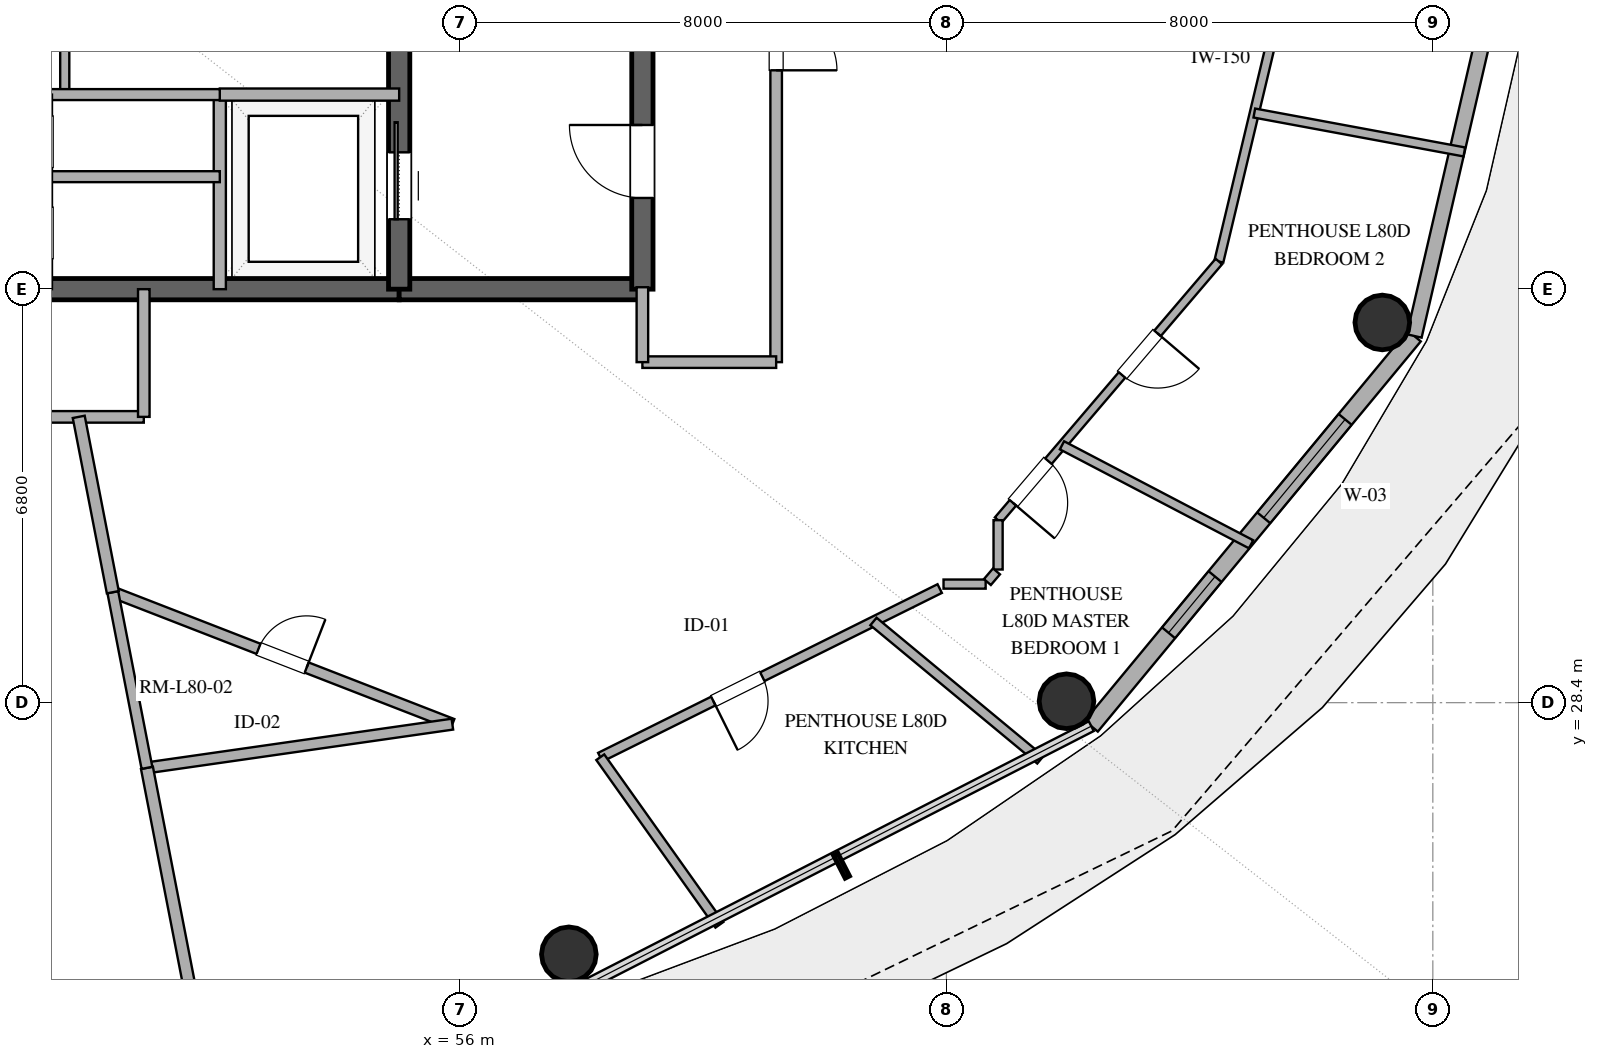
"""IFC4 building model, lengths in metres.
Left out: names, types, materials, properties, quantities, classifications, styles, units other than length and angle.
Written with IfcOpenShell. Run it as: python <this file> out.ifc"""

import sys

from ifc_helpers import new_model, si_unit, direction, frame, frame_2d, origin, origin_2d, place, context, subcontext, project, spatial, rectangle, hollow_circle, extrude, element, fill, save


model = new_model("IFC4")
c1 = context("Model", 3, precision=1e-05, world=origin(), true_north=direction((0.0, 1.0)))
c2 = subcontext(c1, "Body", "Model", "MODEL_VIEW")
j1 = project(units=[si_unit("LENGTHUNIT", "METRE"), si_unit("PLANEANGLEUNIT", "RADIAN")], contexts=[c1])
p1 = place(None, origin())
s1 = spatial("IfcSite", under=j1, at=p1, CompositionType="ELEMENT")
p2 = place(p1, origin())
s2 = spatial("IfcBuilding", under=s1, at=p2, CompositionType="ELEMENT")
p3 = place(p2, frame((0.0, 0.0, 309.0)))
s3 = spatial("IfcBuildingStorey", under=s2, at=p3, CompositionType="ELEMENT", Elevation=309.0)
p4 = place(p3, frame((41.0, 35.2, 0.0), z_axis=(0.0, 0.0, 1.0), x_axis=(1.0, 0.0, 0.0)))
e1 = element("IfcWall", 1, at=p4, inside=s3, PredefinedType="SHEAR", context=c2, shape_type="SweptSolid", body=[
    extrude(rectangle(XDim=14.0, YDim=0.35, at=frame_2d((7.0, 0.0))), origin(), (0.0, 0.0, 1.0), 3.37),
])
p5 = place(p4, frame((6.1, 0.0, 0.0)))
e2 = element("IfcOpeningElement", 2, at=p5, cuts=e1, PredefinedType="OPENING", context=c2, shape_type="SweptSolid", body=[
    extrude(rectangle(XDim=1.8, YDim=2.25, at=frame_2d((0.9, 1.125))), frame((0.0, 0.185, 0.0), z_axis=(0.0, -1.0, 0.0), x_axis=(1.0, 0.0, 0.0)), (0.0, 0.0, 1.0), 0.37),
])
p6 = place(p3, frame((55.0, 35.2, 0.0), z_axis=(0.0, 0.0, 1.0), x_axis=(1.0, 0.0, 0.0)))
e3 = element("IfcWall", 3, at=p6, inside=s3, PredefinedType="SHEAR", context=c2, shape_type="SweptSolid", body=[
    extrude(rectangle(XDim=4.0, YDim=0.35, at=frame_2d((2.0, 0.0))), origin(), (0.0, 0.0, 1.0), 3.37),
])
p7 = place(p3, frame((59.0, 35.2, 0.0), z_axis=(0.0, 0.0, 1.0), x_axis=(0.0, 1.0, 0.0)))
e4 = element("IfcWall", 4, at=p7, inside=s3, PredefinedType="SHEAR", context=c2, shape_type="SweptSolid", body=[
    extrude(rectangle(XDim=13.6, YDim=0.35, at=frame_2d((6.8, 0.0))), origin(), (0.0, 0.0, 1.0), 3.37),
])
p8 = place(p7, frame((1.5, 0.0, 0.0)))
e5 = element("IfcOpeningElement", 5, at=p8, cuts=e4, PredefinedType="OPENING", context=c2, shape_type="SweptSolid", body=[
    extrude(rectangle(XDim=1.2, YDim=2.15, at=frame_2d((0.6, 1.075))), frame((0.0, 0.185, 0.0), z_axis=(0.0, -1.0, 0.0), x_axis=(1.0, 0.0, 0.0)), (0.0, 0.0, 1.0), 0.37),
])
p9 = place(p3, frame((55.0, 35.2, 0.0), z_axis=(0.0, 0.0, 1.0), x_axis=(0.0, 1.0, 0.0)))
e6 = element("IfcWall", 6, at=p9, inside=s3, PredefinedType="SHEAR", context=c2, shape_type="SweptSolid", body=[
    extrude(rectangle(XDim=13.6, YDim=0.35, at=frame_2d((6.8, 0.0))), origin(), (0.0, 0.0, 1.0), 3.37),
])
p10 = place(p9, frame((1.15, 0.0, 0.0)))
e7 = element("IfcOpeningElement", 7, at=p10, cuts=e6, PredefinedType="OPENING", context=c2, shape_type="SweptSolid", body=[
    extrude(rectangle(XDim=1.1, YDim=2.2, at=frame_2d((0.55, 1.1))), frame((0.0, 0.185, 0.0), z_axis=(0.0, -1.0, 0.0), x_axis=(1.0, 0.0, 0.0)), (0.0, 0.0, 1.0), 0.37),
])
for number, where, z_axis, x_axis in (
    (8, (57.791, 24.261, 0.0), (0.0, 0.0, 1.0), (1.0, 0.0, 0.0)),
    (9, (65.975, 28.424, 0.0), (0.0, 0.0, 1.0), (1.0, 0.0, 0.0)),
    (10, (71.169, 34.653, 0.0), (0.0, 0.0, 1.0), (1.0, 0.0, 0.0)),
):
    element("IfcColumn", number, at=place(p3, frame(where, z_axis=z_axis, x_axis=x_axis)), inside=s3, PredefinedType="COLUMN", context=c2, shape_type="SweptSolid", body=[
        extrude(hollow_circle(Radius=0.45, WallThickness=0.025, at=origin_2d()), origin(), (0.0, 0.0, 1.0), 3.37),
    ])
p11 = place(p3, frame((48.0, 22.22, 0.0), z_axis=(0.0, 0.0, 1.0), x_axis=(0.988882522213, 0.148698881169, 0.0)))
e11 = element("IfcWall", 11, at=p11, inside=s3, PredefinedType="SOLIDWALL", context=c2, shape_type="SweptSolid", body=[
    extrude(rectangle(XDim=10.125, YDim=0.28, at=frame_2d((5.062, 0.0))), origin(), (0.0, 0.0, 1.0), 3.37),
])
p12 = place(p11, frame((1.516, 0.0, 0.0)))
e12 = element("IfcOpeningElement", 12, at=p12, cuts=e11, PredefinedType="OPENING", context=c2, shape_type="SweptSolid", body=[
    extrude(rectangle(XDim=1.05, YDim=2.2, at=frame_2d((0.525, 1.1))), frame((0.0, 0.15, 0.0), z_axis=(0.0, -1.0, 0.0), x_axis=(1.0, 0.0, 0.0)), (0.0, 0.0, 1.0), 0.3),
])
p13 = place(p11, frame((4.75, 0.0, 0.85)))
e13 = element("IfcOpeningElement", 13, at=p13, cuts=e11, PredefinedType="OPENING", context=c2, shape_type="SweptSolid", body=[
    extrude(rectangle(XDim=1.2, YDim=1.8, at=frame_2d((0.6, 0.9))), frame((0.0, 0.15, 0.0), z_axis=(0.0, -1.0, 0.0), x_axis=(1.0, 0.0, 0.0)), (0.0, 0.0, 1.0), 0.3),
])
p14 = place(p11, frame((6.668, 0.0, 0.85)))
e14 = element("IfcOpeningElement", 14, at=p14, cuts=e11, PredefinedType="OPENING", context=c2, shape_type="SweptSolid", body=[
    extrude(rectangle(XDim=1.2, YDim=1.8, at=frame_2d((0.6, 0.9))), frame((0.0, 0.15, 0.0), z_axis=(0.0, -1.0, 0.0), x_axis=(1.0, 0.0, 0.0)), (0.0, 0.0, 1.0), 0.3),
])
p15 = place(p3, frame((66.383, 28.013, 0.0), z_axis=(0.0, 0.0, 1.0), x_axis=(0.63761509934, 0.770355103243, 0.0)))
e15 = element("IfcWall", 15, at=p15, inside=s3, PredefinedType="SOLIDWALL", context=c2, shape_type="SweptSolid", body=[
    extrude(rectangle(XDim=8.33, YDim=0.28, at=frame_2d((4.165, 0.0))), origin(), (0.0, 0.0, 1.0), 3.37),
])
p16 = place(p15, frame((1.993, 0.0, 0.85)))
e16 = element("IfcOpeningElement", 16, at=p16, cuts=e15, PredefinedType="OPENING", context=c2, shape_type="SweptSolid", body=[
    extrude(rectangle(XDim=1.2, YDim=1.6, at=frame_2d((0.6, 0.8))), frame((0.0, 0.15, 0.0), z_axis=(0.0, -1.0, 0.0), x_axis=(1.0, 0.0, 0.0)), (0.0, 0.0, 1.0), 0.3),
])
p17 = place(p15, frame((4.448, 0.0, 0.85)))
e17 = element("IfcOpeningElement", 17, at=p17, cuts=e15, PredefinedType="OPENING", context=c2, shape_type="SweptSolid", body=[
    extrude(rectangle(XDim=2.1, YDim=2.2, at=frame_2d((1.05, 1.1))), frame((0.0, 0.15, 0.0), z_axis=(0.0, -1.0, 0.0), x_axis=(1.0, 0.0, 0.0)), (0.0, 0.0, 1.0), 0.3),
])
p18 = place(p3, frame((71.694, 34.43, 0.0), z_axis=(0.0, 0.0, 1.0), x_axis=(0.225635078214, 0.974211892495, 0.0)))
e18 = element("IfcWall", 18, at=p18, inside=s3, PredefinedType="SOLIDWALL", context=c2, shape_type="SweptSolid", body=[
    extrude(rectangle(XDim=7.77, YDim=0.25, at=frame_2d((3.885, 0.0))), origin(), (0.0, 0.0, 1.0), 3.37),
])
p19 = place(p3, frame((52.05, 35.2, 0.0), z_axis=(0.0, 0.0, 1.0), x_axis=(0.0, 1.0, 0.0)))
e19 = element("IfcWall", 19, at=p19, inside=s3, PredefinedType="SOLIDWALL", context=c2, shape_type="SweptSolid", body=[
    extrude(rectangle(XDim=3.2, YDim=0.2, at=frame_2d((1.6, 0.0))), origin(), (0.0, 0.0, 1.0), 2.73),
])
p20 = place(p3, frame((52.05, 38.4, 0.0), z_axis=(0.0, 0.0, 1.0), x_axis=(1.0, 0.0, 0.0)))
e20 = element("IfcWall", 20, at=p20, inside=s3, PredefinedType="SOLIDWALL", context=c2, shape_type="SweptSolid", body=[
    extrude(rectangle(XDim=2.95, YDim=0.2, at=frame_2d((1.475, 0.0))), origin(), (0.0, 0.0, 1.0), 2.73),
])
p21 = place(p3, frame((49.5, 38.4, 0.0), z_axis=(0.0, 0.0, 1.0), x_axis=(0.0, 1.0, 0.0)))
e21 = element("IfcWall", 21, at=p21, inside=s3, PredefinedType="PARTITIONING", context=c2, shape_type="SweptSolid", body=[
    extrude(rectangle(XDim=2.58, YDim=0.15, at=frame_2d((1.29, 0.0))), origin(), (0.0, 0.0, 1.0), 2.73),
])
p22 = place(p21, frame((0.8, 0.0, 0.0)))
e22 = element("IfcOpeningElement", 22, at=p22, cuts=e21, PredefinedType="OPENING", context=c2, shape_type="SweptSolid", body=[
    extrude(rectangle(XDim=0.9, YDim=2.15, at=frame_2d((0.45, 1.075))), frame((0.0, 0.085, 0.0), z_axis=(0.0, -1.0, 0.0), x_axis=(1.0, 0.0, 0.0)), (0.0, 0.0, 1.0), 0.17),
])
for number, where, z_axis, x_axis in (
    (23, (49.2, 37.05, 0.0), (0.0, 0.0, 1.0), (1.0, 0.0, 0.0)),
    (24, (49.2, 38.4, 0.0), (0.0, 0.0, 1.0), (1.0, 0.0, 0.0)),
):
    element("IfcWall", number, at=place(p3, frame(where, z_axis=z_axis, x_axis=x_axis)), inside=s3, PredefinedType="PLUMBINGWALL", context=c2, shape_type="SweptSolid", body=[
        extrude(rectangle(XDim=2.85, YDim=0.18, at=frame_2d((1.425, 0.0))), origin(), (0.0, 0.0, 1.0), 2.73),
    ])
p23 = place(p3, frame((61.2, 50.9, 0.0), z_axis=(0.0, 0.0, 1.0), x_axis=(0.0, -1.0, 0.0)))
e25 = element("IfcWall", 25, at=p23, inside=s3, PredefinedType="PARTITIONING", context=c2, shape_type="SweptSolid", body=[
    extrude(rectangle(XDim=16.9, YDim=0.19, at=frame_2d((8.45, 0.0))), origin(), (0.0, 0.0, 1.0), 2.73),
])
p24 = place(p23, frame((11.101, 0.0, 0.0)))
e26 = element("IfcOpeningElement", 26, at=p24, cuts=e25, PredefinedType="OPENING", context=c2, shape_type="SweptSolid", body=[
    extrude(rectangle(XDim=1.0, YDim=2.2, at=frame_2d((0.5, 1.1))), frame((0.0, 0.105, 0.0), z_axis=(0.0, -1.0, 0.0), x_axis=(1.0, 0.0, 0.0)), (0.0, 0.0, 1.0), 0.21),
])
p25 = place(p3, frame((50.291, 30.216, 0.0), z_axis=(0.0, 0.0, 1.0), x_axis=(0.932120865565, -0.362147334628, 0.0)))
e27 = element("IfcWall", 27, at=p25, inside=s3, PredefinedType="PLUMBINGWALL", context=c2, shape_type="SweptSolid", body=[
    extrude(rectangle(XDim=5.991, YDim=0.18, at=frame_2d((2.996, 0.0))), origin(), (0.0, 0.0, 1.0), 2.73),
])
p26 = place(p25, frame((2.571, 0.0, 0.0)))
e28 = element("IfcOpeningElement", 28, at=p26, cuts=e27, PredefinedType="OPENING", context=c2, shape_type="SweptSolid", body=[
    extrude(rectangle(XDim=0.85, YDim=2.1, at=frame_2d((0.425, 1.05))), frame((0.0, 0.1, 0.0), z_axis=(0.0, -1.0, 0.0), x_axis=(1.0, 0.0, 0.0)), (0.0, 0.0, 1.0), 0.2),
])
p27 = place(p3, frame((55.875, 28.047, 0.0), z_axis=(0.0, 0.0, 1.0), x_axis=(-0.989917714359, -0.141643633102, 0.0)))
e29 = element("IfcWall", 29, at=p27, inside=s3, PredefinedType="PLUMBINGWALL", context=c2, shape_type="SweptSolid", body=[
    extrude(rectangle(XDim=5.074, YDim=0.18, at=frame_2d((2.537, 0.0))), origin(), (0.0, 0.0, 1.0), 2.73),
])
p28 = place(p3, frame((63.89, 30.276, 0.0), z_axis=(0.0, 0.0, 1.0), x_axis=(-0.895583517023, -0.444893429977, 0.0)))
e30 = element("IfcWall", 30, at=p28, inside=s3, PredefinedType="PLUMBINGWALL", context=c2, shape_type="SweptSolid", body=[
    extrude(rectangle(XDim=6.233, YDim=0.16, at=frame_2d((3.117, 0.0))), origin(), (0.0, 0.0, 1.0), 2.73),
])
p29 = place(p28, frame((3.257, 0.0, 0.0)))
e31 = element("IfcOpeningElement", 31, at=p29, cuts=e30, PredefinedType="OPENING", context=c2, shape_type="SweptSolid", body=[
    extrude(rectangle(XDim=0.9, YDim=2.1, at=frame_2d((0.45, 1.05))), frame((0.0, 0.09, 0.0), z_axis=(0.0, -1.0, 0.0), x_axis=(1.0, 0.0, 0.0)), (0.0, 0.0, 1.0), 0.18),
])
p30 = place(p3, frame((51.759, 22.664, 0.0), z_axis=(0.0, 0.0, 1.0), x_axis=(-0.190846277625, 0.981619935778, 0.0)))
e32 = element("IfcWall", 32, at=p30, inside=s3, PredefinedType="PARTITIONING", context=c2, shape_type="SweptSolid", body=[
    extrude(rectangle(XDim=4.751, YDim=0.2, at=frame_2d((2.375, 0.0))), origin(), (0.0, 0.0, 1.0), 2.73),
])
p31 = place(p3, frame((50.8, 33.1, 0.0), z_axis=(0.0, 0.0, 1.0), x_axis=(-1.0, 0.0, 0.0)))
e33 = element("IfcWall", 33, at=p31, inside=s3, PredefinedType="PARTITIONING", context=c2, shape_type="SweptSolid", body=[
    extrude(rectangle(XDim=5.6, YDim=0.19, at=frame_2d((2.8, 0.0))), origin(), (0.0, 0.0, 1.0), 2.73),
])
p32 = place(p3, frame((68.481, 35.655, 0.0), z_axis=(0.0, 0.0, 1.0), x_axis=(0.232298462197, 0.972644551962, 0.0)))
e34 = element("IfcWall", 34, at=p32, inside=s3, PredefinedType="PARTITIONING", context=c2, shape_type="SweptSolid", body=[
    extrude(rectangle(XDim=6.523, YDim=0.15, at=frame_2d((3.262, 0.0))), origin(), (0.0, 0.0, 1.0), 2.73),
])
p33 = place(p3, frame((68.481, 35.655, 0.0), z_axis=(0.0, 0.0, 1.0), x_axis=(-0.649186624806, -0.760629164688, 0.0)))
e35 = element("IfcWall", 35, at=p33, inside=s3, PredefinedType="PARTITIONING", context=c2, shape_type="SweptSolid", body=[
    extrude(rectangle(XDim=5.593, YDim=0.14, at=frame_2d((2.796, 0.0))), origin(), (0.0, 0.0, 1.0), 2.73),
])
p34 = place(p33, frame((1.553, 0.0, 0.0)))
e36 = element("IfcOpeningElement", 36, at=p34, cuts=e35, PredefinedType="OPENING", context=c2, shape_type="SweptSolid", body=[
    extrude(rectangle(XDim=0.9, YDim=2.1, at=frame_2d((0.45, 1.05))), frame((0.0, 0.08, 0.0), z_axis=(0.0, -1.0, 0.0), x_axis=(1.0, 0.0, 0.0)), (0.0, 0.0, 1.0), 0.16),
])
p35 = place(p33, frame((4.317, 0.0, 0.0)))
e37 = element("IfcOpeningElement", 37, at=p35, cuts=e35, PredefinedType="OPENING", context=c2, shape_type="SweptSolid", body=[
    extrude(rectangle(XDim=0.9, YDim=2.1, at=frame_2d((0.45, 1.05))), frame((0.0, 0.08, 0.0), z_axis=(0.0, -1.0, 0.0), x_axis=(1.0, 0.0, 0.0)), (0.0, 0.0, 1.0), 0.16),
])
p36 = place(p3, frame((65.545, 27.461, 0.0), z_axis=(0.0, 0.0, 1.0), x_axis=(-0.770009063214, 0.63803294787, 0.0)))
e38 = element("IfcWall", 38, at=p36, inside=s3, PredefinedType="PLUMBINGWALL", context=c2, shape_type="SweptSolid", body=[
    extrude(rectangle(XDim=3.565, YDim=0.16, at=frame_2d((1.782, 0.0))), origin(), (0.0, 0.0, 1.0), 2.73),
])
p37 = place(p3, frame((72.518, 37.457, 0.0), z_axis=(0.0, 0.0, 1.0), x_axis=(-0.983264946239, 0.182181353322, 0.0)))
e39 = element("IfcWall", 39, at=p37, inside=s3, PredefinedType="PARTITIONING", context=c2, shape_type="SweptSolid", body=[
    extrude(rectangle(XDim=3.512, YDim=0.15, at=frame_2d((1.756, 0.0))), origin(), (0.0, 0.0, 1.0), 2.73),
])
p38 = place(p3, frame((65.901, 32.632, 0.0), z_axis=(0.0, 0.0, 1.0), x_axis=(0.886011177193, -0.463663880293, 0.0)))
e40 = element("IfcWall", 40, at=p38, inside=s3, PredefinedType="PARTITIONING", context=c2, shape_type="SweptSolid", body=[
    extrude(rectangle(XDim=3.51, YDim=0.15, at=frame_2d((1.755, 0.0))), origin(), (0.0, 0.0, 1.0), 2.73),
])
p39 = place(p3, frame((58.307, 27.503, 0.0), z_axis=(0.0, 0.0, 1.0), x_axis=(0.579474768135, -0.814990179754, 0.0)))
e41 = element("IfcWall", 41, at=p39, inside=s3, PredefinedType="PLUMBINGWALL", context=c2, shape_type="SweptSolid", body=[
    extrude(rectangle(XDim=3.381, YDim=0.16, at=frame_2d((1.691, 0.0))), origin(), (0.0, 0.0, 1.0), 2.73),
])
p40 = place(p3, frame((50.852, 27.328, 0.0), z_axis=(0.0, 0.0, 1.0), x_axis=(-0.190751955115, 0.981638269232, 0.0)))
e42 = element("IfcWall", 42, at=p40, inside=s3, PredefinedType="PLUMBINGWALL", context=c2, shape_type="SweptSolid", body=[
    extrude(rectangle(XDim=2.942, YDim=0.18, at=frame_2d((1.471, 0.0))), origin(), (0.0, 0.0, 1.0), 2.73),
])
p41 = place(p3, frame((50.291, 30.216, 0.0), z_axis=(0.0, 0.0, 1.0), x_axis=(-0.190807376865, 0.981627498053, 0.0)))
e43 = element("IfcWall", 43, at=p41, inside=s3, PredefinedType="PARTITIONING", context=c2, shape_type="SweptSolid", body=[
    extrude(rectangle(XDim=2.938, YDim=0.2, at=frame_2d((1.469, 0.0))), origin(), (0.0, 0.0, 1.0), 2.73),
])
p42 = place(p3, frame((61.2, 34.0, 0.0), z_axis=(0.0, 0.0, 1.0), x_axis=(-1.0, 0.0, 0.0)))
e44 = element("IfcWall", 44, at=p42, inside=s3, PredefinedType="PARTITIONING", context=c2, shape_type="SweptSolid", body=[
    extrude(rectangle(XDim=2.2, YDim=0.19, at=frame_2d((1.1, 0.0))), origin(), (0.0, 0.0, 1.0), 2.73),
])
p43 = place(p3, frame((50.8, 35.2, 0.0), z_axis=(0.0, 0.0, 1.0), x_axis=(0.0, -1.0, 0.0)))
e45 = element("IfcWall", 45, at=p43, inside=s3, PredefinedType="PARTITIONING", context=c2, shape_type="SweptSolid", body=[
    extrude(rectangle(XDim=2.1, YDim=0.19, at=frame_2d((1.05, 0.0))), origin(), (0.0, 0.0, 1.0), 2.73),
])
p44 = place(p3, frame((59.0, 34.0, 0.0), z_axis=(0.0, 0.0, 1.0), x_axis=(0.0, 1.0, 0.0)))
e46 = element("IfcWall", 46, at=p44, inside=s3, PredefinedType="PARTITIONING", context=c2, shape_type="SweptSolid", body=[
    extrude(rectangle(XDim=1.232, YDim=0.19, at=frame_2d((0.616, 0.0))), origin(), (0.0, 0.0, 1.0), 2.73),
])
p45 = place(p3, frame((64.85, 31.401, 0.0), z_axis=(0.0, 0.0, 1.0), x_axis=(0.0, -1.0, 0.0)))
e47 = element("IfcWall", 47, at=p45, inside=s3, PredefinedType="PARTITIONING", context=c2, shape_type="SweptSolid", body=[
    extrude(rectangle(XDim=0.812, YDim=0.15, at=frame_2d((0.406, 0.0))), origin(), (0.0, 0.0, 1.0), 2.73),
])
p46 = place(p3, frame((64.646, 30.35, 0.0), z_axis=(0.0, 0.0, 1.0), x_axis=(-1.0, 0.0, 0.0)))
e48 = element("IfcWall", 48, at=p46, inside=s3, PredefinedType="PARTITIONING", context=c2, shape_type="SweptSolid", body=[
    extrude(rectangle(XDim=0.693, YDim=0.15, at=frame_2d((0.346, 0.0))), origin(), (0.0, 0.0, 1.0), 2.73),
])
p47 = place(p3, frame((64.824, 30.559, 0.0), z_axis=(0.0, 0.0, 1.0), x_axis=(-0.648874632887, -0.760895334981, 0.0)))
e49 = element("IfcWall", 49, at=p47, inside=s3, PredefinedType="PARTITIONING", context=c2, shape_type="SweptSolid", body=[
    extrude(rectangle(XDim=0.231, YDim=0.15, at=frame_2d((0.115, 0.0))), origin(), (0.0, 0.0, 1.0), 2.73),
])
p48 = place(p16, origin())
e50 = element("IfcWindow", 50, at=p48, inside=s3, PartitioningType="SINGLE_PANEL", PredefinedType="WINDOW", context=c2, shape_type="SweptSolid", body=[
    extrude(rectangle(XDim=1.2, YDim=1.6, at=frame_2d((0.6, 0.8))), frame((0.0, 0.03, 0.0), z_axis=(0.0, -1.0, 0.0), x_axis=(1.0, 0.0, 0.0)), (0.0, 0.0, 1.0), 0.06),
])
fill(e16, e50)
p49 = place(p17, origin())
e51 = element("IfcWindow", 51, at=p49, inside=s3, PartitioningType="SINGLE_PANEL", PredefinedType="WINDOW", context=c2, shape_type="SweptSolid", body=[
    extrude(rectangle(XDim=2.1, YDim=2.2, at=frame_2d((1.05, 1.1))), frame((0.0, 0.03, 0.0), z_axis=(0.0, -1.0, 0.0), x_axis=(1.0, 0.0, 0.0)), (0.0, 0.0, 1.0), 0.06),
])
fill(e17, e51)
p50 = place(p10, origin())
e52 = element("IfcDoor", 52, at=p50, inside=s3, OperationType="SLIDING_TO_RIGHT", PredefinedType="DOOR", context=c2, shape_type="SweptSolid", body=[
    extrude(rectangle(XDim=1.1, YDim=2.2, at=frame_2d((0.55, 1.1))), frame((0.0, 0.025, 0.0), z_axis=(0.0, -1.0, 0.0), x_axis=(1.0, 0.0, 0.0)), (0.0, 0.0, 1.0), 0.05),
])
fill(e7, e52)
p51 = place(p8, origin())
e53 = element("IfcDoor", 53, at=p51, inside=s3, OperationType="SINGLE_SWING_RIGHT", PredefinedType="DOOR", context=c2, shape_type="SweptSolid", body=[
    extrude(rectangle(XDim=1.2, YDim=2.15, at=frame_2d((0.6, 1.075))), frame((0.0, 0.025, 0.0), z_axis=(0.0, -1.0, 0.0), x_axis=(1.0, 0.0, 0.0)), (0.0, 0.0, 1.0), 0.05),
])
fill(e5, e53)
p52 = place(p24, origin())
e54 = element("IfcDoor", 54, at=p52, inside=s3, OperationType="SINGLE_SWING_RIGHT", PredefinedType="DOOR", context=c2, shape_type="SweptSolid", body=[
    extrude(rectangle(XDim=1.0, YDim=2.2, at=frame_2d((0.5, 1.1))), frame((0.0, 0.025, 0.0), z_axis=(0.0, -1.0, 0.0), x_axis=(1.0, 0.0, 0.0)), (0.0, 0.0, 1.0), 0.05),
])
fill(e26, e54)
p53 = place(p26, origin())
e55 = element("IfcDoor", 55, at=p53, inside=s3, OperationType="SINGLE_SWING_RIGHT", PredefinedType="DOOR", context=c2, shape_type="SweptSolid", body=[
    extrude(rectangle(XDim=0.85, YDim=2.1, at=frame_2d((0.425, 1.05))), frame((0.0, 0.025, 0.0), z_axis=(0.0, -1.0, 0.0), x_axis=(1.0, 0.0, 0.0)), (0.0, 0.0, 1.0), 0.05),
])
fill(e28, e55)
p54 = place(p29, origin())
e56 = element("IfcDoor", 56, at=p54, inside=s3, OperationType="SINGLE_SWING_RIGHT", PredefinedType="DOOR", context=c2, shape_type="SweptSolid", body=[
    extrude(rectangle(XDim=0.9, YDim=2.1, at=frame_2d((0.45, 1.05))), frame((0.0, 0.025, 0.0), z_axis=(0.0, -1.0, 0.0), x_axis=(1.0, 0.0, 0.0)), (0.0, 0.0, 1.0), 0.05),
])
fill(e31, e56)
p55 = place(p34, origin())
e57 = element("IfcDoor", 57, at=p55, inside=s3, OperationType="SINGLE_SWING_LEFT", PredefinedType="DOOR", context=c2, shape_type="SweptSolid", body=[
    extrude(rectangle(XDim=0.9, YDim=2.1, at=frame_2d((0.45, 1.05))), frame((0.0, 0.025, 0.0), z_axis=(0.0, -1.0, 0.0), x_axis=(1.0, 0.0, 0.0)), (0.0, 0.0, 1.0), 0.05),
])
fill(e36, e57)
p56 = place(p35, origin())
e58 = element("IfcDoor", 58, at=p56, inside=s3, OperationType="SINGLE_SWING_RIGHT", PredefinedType="DOOR", context=c2, shape_type="SweptSolid", body=[
    extrude(rectangle(XDim=0.9, YDim=2.1, at=frame_2d((0.45, 1.05))), frame((0.0, 0.025, 0.0), z_axis=(0.0, -1.0, 0.0), x_axis=(1.0, 0.0, 0.0)), (0.0, 0.0, 1.0), 0.05),
])
fill(e37, e58)
save(model, sys.argv[1])
